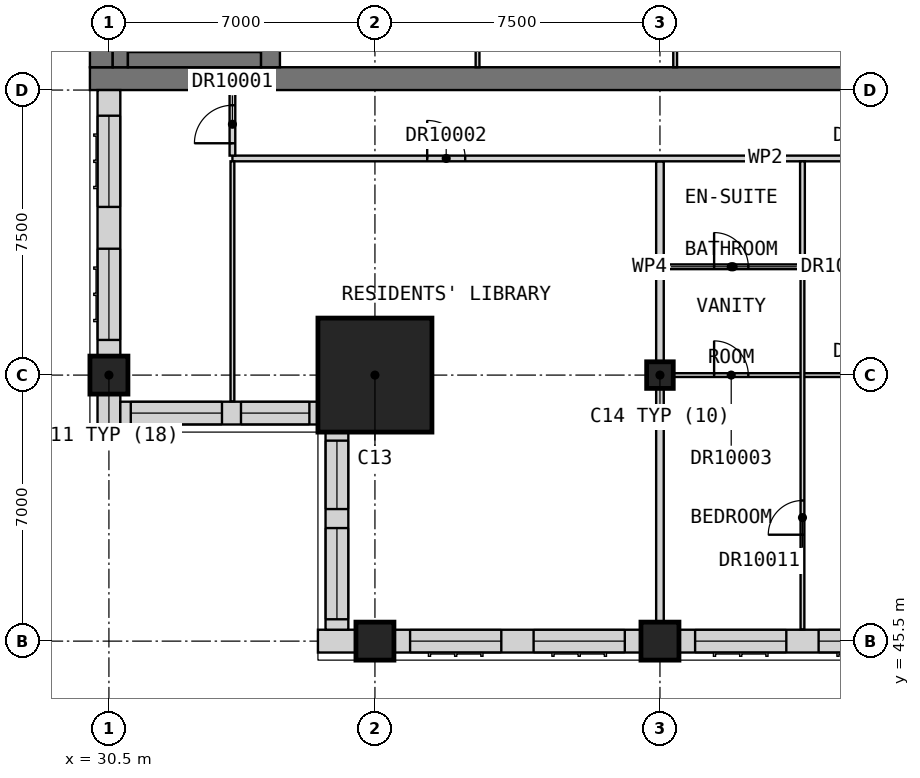
"""IFC4 building model, lengths in metres.
Left out: names, types, materials, properties, quantities, classifications, styles, units other than length and angle.
Written with IfcOpenShell. Run it as: python <this file> out.ifc"""

import sys

from ifc_helpers import new_model, si_unit, direction, frame, frame_2d, origin, origin_2d, place, context, subcontext, project, spatial, rectangle, extrude, element, fill, save


model = new_model("IFC4")
c1 = context("Model", 3, precision=1e-05, world=origin(), true_north=direction((0.0, 1.0)))
c2 = subcontext(c1, "Body", "Model", "MODEL_VIEW")
j1 = project(units=[si_unit("LENGTHUNIT", "METRE"), si_unit("PLANEANGLEUNIT", "RADIAN")], contexts=[c1])
p1 = place(None, origin())
s1 = spatial("IfcSite", under=j1, at=p1, CompositionType="ELEMENT")
p2 = place(p1, origin())
s2 = spatial("IfcBuilding", under=s1, at=p2, CompositionType="ELEMENT")
p3 = place(p2, frame((0.0, 0.0, 283.7)))
s3 = spatial("IfcBuildingStorey", under=s2, at=p3, CompositionType="ELEMENT", Elevation=283.7)
for number, where, z_axis, x_axis in (
    (1, (30.5, 52.5, 0.0), (0.0, 0.0, 1.0), (1.0, 0.0, 0.0)),
    (2, (37.5, 45.5, 0.0), (0.0, 0.0, 1.0), (1.0, 0.0, 0.0)),
    (3, (45.0, 45.5, 0.0), (0.0, 0.0, 1.0), (1.0, 0.0, 0.0)),
):
    element("IfcColumn", number, at=place(p3, frame(where, z_axis=z_axis, x_axis=x_axis)), inside=s3, PredefinedType="COLUMN", context=c2, shape_type="SweptSolid", body=[
        extrude(rectangle(XDim=1.0, YDim=1.0, at=origin_2d()), origin(), (0.0, 0.0, 1.0), 3.5),
    ])
p4 = place(p3, frame((45.0, 52.5, 0.0), z_axis=(0.0, 0.0, 1.0), x_axis=(1.0, 0.0, 0.0)))
e4 = element("IfcColumn", 4, at=p4, inside=s3, PredefinedType="COLUMN", context=c2, shape_type="SweptSolid", body=[
    extrude(rectangle(XDim=0.7, YDim=0.7, at=origin_2d()), origin(), (0.0, 0.0, 1.0), 3.5),
])
p5 = place(p3, frame((37.5, 52.5, 0.0), z_axis=(0.0, 0.0, 1.0), x_axis=(1.0, 0.0, 0.0)))
e5 = element("IfcColumn", 5, at=p5, inside=s3, PredefinedType="COLUMN", context=c2, shape_type="SweptSolid", body=[
    extrude(rectangle(XDim=3.0, YDim=3.0, at=origin_2d()), origin(), (0.0, 0.0, 1.0), 3.5),
])
p6 = place(p3, frame((30.0, 60.3, 0.0), z_axis=(0.0, 0.0, 1.0), x_axis=(1.0, 0.0, 0.0)))
e6 = element("IfcWall", 6, at=p6, inside=s3, PredefinedType="SHEAR", context=c2, shape_type="SweptSolid", body=[
    extrude(rectangle(XDim=30.0, YDim=0.6, at=frame_2d((15.0, 0.0))), origin(), (0.0, 0.0, 1.0), 3.5),
])
p7 = place(p6, frame((21.9, 0.0, 0.0)))
e7 = element("IfcOpeningElement", 7, at=p7, cuts=e6, PredefinedType="OPENING", context=c2, shape_type="SweptSolid", body=[
    extrude(rectangle(XDim=1.8, YDim=2.1, at=frame_2d((0.9, 1.05))), frame((0.0, 0.31, 0.0), z_axis=(0.0, -1.0, 0.0), x_axis=(1.0, 0.0, 0.0)), (0.0, 0.0, 1.0), 0.62),
])
p8 = place(p6, frame((26.5, 0.0, 0.0)))
e8 = element("IfcOpeningElement", 8, at=p8, cuts=e6, PredefinedType="OPENING", context=c2, shape_type="SweptSolid", body=[
    extrude(rectangle(XDim=1.2, YDim=2.1, at=frame_2d((0.6, 1.05))), frame((0.0, 0.31, 0.0), z_axis=(0.0, -1.0, 0.0), x_axis=(1.0, 0.0, 0.0)), (0.0, 0.0, 1.0), 0.62),
])
p9 = place(p3, frame((30.3, 60.6, 0.0), z_axis=(0.0, 0.0, 1.0), x_axis=(0.0, 1.0, 0.0)))
e9 = element("IfcWall", 9, at=p9, inside=s3, PredefinedType="SHEAR", context=c2, shape_type="SweptSolid", body=[
    extrude(rectangle(XDim=21.3, YDim=0.6, at=frame_2d((10.65, 0.0))), origin(), (0.0, 0.0, 1.0), 3.5),
])
p10 = place(p3, frame((34.75, 60.6, 0.0), z_axis=(0.0, 0.0, 1.0), x_axis=(0.0, 1.0, 0.0)))
e10 = element("IfcWall", 10, at=p10, inside=s3, PredefinedType="SHEAR", context=c2, shape_type="SweptSolid", body=[
    extrude(rectangle(XDim=3.6, YDim=0.5, at=frame_2d((1.8, 0.0))), origin(), (0.0, 0.0, 1.0), 3.5),
])
p11 = place(p3, frame((36.0, 45.5, 0.0), z_axis=(0.0, 0.0, 1.0), x_axis=(1.0, 0.0, 0.0)))
e11 = element("IfcWall", 11, at=p11, inside=s3, PredefinedType="SOLIDWALL", context=c2, shape_type="SweptSolid", body=[
    extrude(rectangle(XDim=1.0, YDim=0.6, at=frame_2d((0.5, 0.0))), origin(), (0.0, 0.0, 1.0), 3.2),
])
p12 = place(p3, frame((38.0, 45.5, 0.0), z_axis=(0.0, 0.0, 1.0), x_axis=(1.0, 0.0, 0.0)))
e12 = element("IfcWall", 12, at=p12, inside=s3, PredefinedType="SOLIDWALL", context=c2, shape_type="SweptSolid", body=[
    extrude(rectangle(XDim=6.5, YDim=0.6, at=frame_2d((3.25, 0.0))), origin(), (0.0, 0.0, 1.0), 2.75),
])
p13 = place(p12, frame((0.425, 0.0, 0.8)))
e13 = element("IfcOpeningElement", 13, at=p13, cuts=e12, PredefinedType="OPENING", context=c2, shape_type="SweptSolid", body=[
    extrude(rectangle(XDim=2.4, YDim=1.8, at=frame_2d((1.2, 0.9))), frame((0.0, 0.31, 0.0), z_axis=(0.0, -1.0, 0.0), x_axis=(1.0, 0.0, 0.0)), (0.0, 0.0, 1.0), 0.62),
])
p14 = place(p12, frame((3.675, 0.0, 0.8)))
e14 = element("IfcOpeningElement", 14, at=p14, cuts=e12, PredefinedType="OPENING", context=c2, shape_type="SweptSolid", body=[
    extrude(rectangle(XDim=2.4, YDim=1.8, at=frame_2d((1.2, 0.9))), frame((0.0, 0.31, 0.0), z_axis=(0.0, -1.0, 0.0), x_axis=(1.0, 0.0, 0.0)), (0.0, 0.0, 1.0), 0.62),
])
p15 = place(p3, frame((45.5, 45.5, 0.0), z_axis=(0.0, 0.0, 1.0), x_axis=(1.0, 0.0, 0.0)))
e15 = element("IfcWall", 15, at=p15, inside=s3, PredefinedType="SOLIDWALL", context=c2, shape_type="SweptSolid", body=[
    extrude(rectangle(XDim=6.5, YDim=0.6, at=frame_2d((3.25, 0.0))), origin(), (0.0, 0.0, 1.0), 2.75),
])
p16 = place(p15, frame((0.425, 0.0, 0.8)))
e16 = element("IfcOpeningElement", 16, at=p16, cuts=e15, PredefinedType="OPENING", context=c2, shape_type="SweptSolid", body=[
    extrude(rectangle(XDim=2.4, YDim=1.8, at=frame_2d((1.2, 0.9))), frame((0.0, 0.31, 0.0), z_axis=(0.0, -1.0, 0.0), x_axis=(1.0, 0.0, 0.0)), (0.0, 0.0, 1.0), 0.62),
])
p17 = place(p15, frame((3.675, 0.0, 0.8)))
e17 = element("IfcOpeningElement", 17, at=p17, cuts=e15, PredefinedType="OPENING", context=c2, shape_type="SweptSolid", body=[
    extrude(rectangle(XDim=2.4, YDim=1.8, at=frame_2d((1.2, 0.9))), frame((0.0, 0.31, 0.0), z_axis=(0.0, -1.0, 0.0), x_axis=(1.0, 0.0, 0.0)), (0.0, 0.0, 1.0), 0.62),
])
p18 = place(p3, frame((30.5, 60.0, 0.0), z_axis=(0.0, 0.0, 1.0), x_axis=(0.0, -1.0, 0.0)))
e18 = element("IfcWall", 18, at=p18, inside=s3, PredefinedType="SOLIDWALL", context=c2, shape_type="SweptSolid", body=[
    extrude(rectangle(XDim=7.0, YDim=0.6, at=frame_2d((3.5, 0.0))), origin(), (0.0, 0.0, 1.0), 3.2),
])
p19 = place(p18, frame((4.175, 0.0, 0.8)))
e19 = element("IfcOpeningElement", 19, at=p19, cuts=e18, PredefinedType="OPENING", context=c2, shape_type="SweptSolid", body=[
    extrude(rectangle(XDim=2.4, YDim=1.8, at=frame_2d((1.2, 0.9))), frame((0.0, 0.31, 0.0), z_axis=(0.0, -1.0, 0.0), x_axis=(1.0, 0.0, 0.0)), (0.0, 0.0, 1.0), 0.62),
])
p20 = place(p18, frame((0.675, 0.0, 0.8)))
e20 = element("IfcOpeningElement", 20, at=p20, cuts=e18, PredefinedType="OPENING", context=c2, shape_type="SweptSolid", body=[
    extrude(rectangle(XDim=2.4, YDim=1.8, at=frame_2d((1.2, 0.9))), frame((0.0, 0.31, 0.0), z_axis=(0.0, -1.0, 0.0), x_axis=(1.0, 0.0, 0.0)), (0.0, 0.0, 1.0), 0.62),
])
p21 = place(p3, frame((30.5, 52.0, 0.0), z_axis=(0.0, 0.0, 1.0), x_axis=(0.0, -1.0, 0.0)))
e21 = element("IfcWall", 21, at=p21, inside=s3, PredefinedType="SOLIDWALL", context=c2, shape_type="SweptSolid", body=[
    extrude(rectangle(XDim=1.0, YDim=0.6, at=frame_2d((0.5, 0.0))), origin(), (0.0, 0.0, 1.0), 3.2),
])
p22 = place(p3, frame((30.8, 51.5, 0.0), z_axis=(0.0, 0.0, 1.0), x_axis=(1.0, 0.0, 0.0)))
e22 = element("IfcWall", 22, at=p22, inside=s3, PredefinedType="SOLIDWALL", context=c2, shape_type="SweptSolid", body=[
    extrude(rectangle(XDim=5.2, YDim=0.6, at=frame_2d((2.6, 0.0))), origin(), (0.0, 0.0, 1.0), 3.2),
])
p23 = place(p22, frame((0.275, 0.0, 0.8)))
e23 = element("IfcOpeningElement", 23, at=p23, cuts=e22, PredefinedType="OPENING", context=c2, shape_type="SweptSolid", body=[
    extrude(rectangle(XDim=2.4, YDim=1.8, at=frame_2d((1.2, 0.9))), frame((0.0, 0.31, 0.0), z_axis=(0.0, -1.0, 0.0), x_axis=(1.0, 0.0, 0.0)), (0.0, 0.0, 1.0), 0.62),
])
p24 = place(p22, frame((3.175, 0.0, 0.8)))
e24 = element("IfcOpeningElement", 24, at=p24, cuts=e22, PredefinedType="OPENING", context=c2, shape_type="SweptSolid", body=[
    extrude(rectangle(XDim=1.8, YDim=1.8, at=frame_2d((0.9, 0.9))), frame((0.0, 0.31, 0.0), z_axis=(0.0, -1.0, 0.0), x_axis=(1.0, 0.0, 0.0)), (0.0, 0.0, 1.0), 0.62),
])
p25 = place(p3, frame((36.5, 51.0, 0.0), z_axis=(0.0, 0.0, 1.0), x_axis=(0.0, -1.0, 0.0)))
e25 = element("IfcWall", 25, at=p25, inside=s3, PredefinedType="SOLIDWALL", context=c2, shape_type="SweptSolid", body=[
    extrude(rectangle(XDim=5.2, YDim=0.6, at=frame_2d((2.6, 0.0))), origin(), (0.0, 0.0, 1.0), 3.2),
])
p26 = place(p25, frame((2.525, 0.0, 0.8)))
e26 = element("IfcOpeningElement", 26, at=p26, cuts=e25, PredefinedType="OPENING", context=c2, shape_type="SweptSolid", body=[
    extrude(rectangle(XDim=2.4, YDim=1.8, at=frame_2d((1.2, 0.9))), frame((0.0, 0.31, 0.0), z_axis=(0.0, -1.0, 0.0), x_axis=(1.0, 0.0, 0.0)), (0.0, 0.0, 1.0), 0.62),
])
p27 = place(p25, frame((0.225, 0.0, 0.8)))
e27 = element("IfcOpeningElement", 27, at=p27, cuts=e25, PredefinedType="OPENING", context=c2, shape_type="SweptSolid", body=[
    extrude(rectangle(XDim=1.8, YDim=1.8, at=frame_2d((0.9, 0.9))), frame((0.0, 0.31, 0.0), z_axis=(0.0, -1.0, 0.0), x_axis=(1.0, 0.0, 0.0)), (0.0, 0.0, 1.0), 0.62),
])
for number, where, z_axis, x_axis in (
    (28, (40.2, 60.6, 0.0), (0.0, 0.0, 1.0), (0.0, 1.0, 0.0)),
    (29, (45.4, 60.6, 0.0), (0.0, 0.0, 1.0), (0.0, 1.0, 0.0)),
):
    element("IfcWall", number, at=place(p3, frame(where, z_axis=z_axis, x_axis=x_axis)), inside=s3, PredefinedType="PARTITIONING", context=c2, shape_type="SweptSolid", body=[
        extrude(rectangle(XDim=3.4, YDim=0.1, at=frame_2d((1.7, 0.0))), origin(), (0.0, 0.0, 1.0), 3.2),
    ])
p28 = place(p3, frame((30.8, 60.6, 0.0), z_axis=(0.0, 0.0, 1.0), x_axis=(0.0, 1.0, 0.0)))
e30 = element("IfcWall", 30, at=p28, inside=s3, PredefinedType="SOLIDWALL", context=c2, shape_type="SweptSolid", body=[
    extrude(rectangle(XDim=21.3, YDim=0.4, at=frame_2d((10.65, 0.0))), origin(), (0.0, 0.0, 1.0), 3.2),
])
p29 = place(p3, frame((31.0, 60.8, 0.0), z_axis=(0.0, 0.0, 1.0), x_axis=(1.0, 0.0, 0.0)))
e31 = element("IfcWall", 31, at=p29, inside=s3, PredefinedType="SOLIDWALL", context=c2, shape_type="SweptSolid", body=[
    extrude(rectangle(XDim=3.5, YDim=0.4, at=frame_2d((1.75, 0.0))), origin(), (0.0, 0.0, 1.0), 3.2),
])
p30 = place(p3, frame((45.0, 45.0, 0.0), z_axis=(0.0, 0.0, 1.0), x_axis=(0.0, 1.0, 0.0)))
e32 = element("IfcWall", 32, at=p30, inside=s3, PredefinedType="PARTITIONING", context=c2, shape_type="SweptSolid", body=[
    extrude(rectangle(XDim=13.125, YDim=0.2, at=frame_2d((6.562, 0.0))), origin(), (0.0, 0.0, 1.0), 3.2),
])
p31 = place(p3, frame((33.75, 58.2, 0.0), z_axis=(0.0, 0.0, 1.0), x_axis=(1.0, 0.0, 0.0)))
e33 = element("IfcWall", 33, at=p31, inside=s3, PredefinedType="PARTITIONING", context=c2, shape_type="SweptSolid", body=[
    extrude(rectangle(XDim=28.05, YDim=0.15, at=frame_2d((14.025, 0.0))), origin(), (0.0, 0.0, 1.0), 3.2),
])
p32 = place(p31, frame((5.125, 0.0, 0.0)))
e34 = element("IfcOpeningElement", 34, at=p32, cuts=e33, PredefinedType="OPENING", context=c2, shape_type="SweptSolid", body=[
    extrude(rectangle(XDim=1.0, YDim=2.1, at=frame_2d((0.5, 1.05))), frame((0.0, 0.085, 0.0), z_axis=(0.0, -1.0, 0.0), x_axis=(1.0, 0.0, 0.0)), (0.0, 0.0, 1.0), 0.17),
])
p33 = place(p31, frame((16.425, 0.0, 0.0)))
e35 = element("IfcOpeningElement", 35, at=p33, cuts=e33, PredefinedType="OPENING", context=c2, shape_type="SweptSolid", body=[
    extrude(rectangle(XDim=0.9, YDim=2.1, at=frame_2d((0.45, 1.05))), frame((0.0, 0.085, 0.0), z_axis=(0.0, -1.0, 0.0), x_axis=(1.0, 0.0, 0.0)), (0.0, 0.0, 1.0), 0.17),
])
p34 = place(p31, frame((26.65, 0.0, 0.0)))
e36 = element("IfcOpeningElement", 36, at=p34, cuts=e33, PredefinedType="OPENING", context=c2, shape_type="SweptSolid", body=[
    extrude(rectangle(XDim=1.0, YDim=2.1, at=frame_2d((0.5, 1.05))), frame((0.0, 0.085, 0.0), z_axis=(0.0, -1.0, 0.0), x_axis=(1.0, 0.0, 0.0)), (0.0, 0.0, 1.0), 0.17),
])
p35 = place(p3, frame((33.75, 58.275, 0.0), z_axis=(0.0, 0.0, 1.0), x_axis=(0.0, 1.0, 0.0)))
e37 = element("IfcWall", 37, at=p35, inside=s3, PredefinedType="PARTITIONING", context=c2, shape_type="SweptSolid", body=[
    extrude(rectangle(XDim=1.725, YDim=0.15, at=frame_2d((0.863, 0.0))), origin(), (0.0, 0.0, 1.0), 3.2),
])
p36 = place(p35, frame((0.325, 0.0, 0.0)))
e38 = element("IfcOpeningElement", 38, at=p36, cuts=e37, PredefinedType="OPENING", context=c2, shape_type="SweptSolid", body=[
    extrude(rectangle(XDim=1.0, YDim=2.1, at=frame_2d((0.5, 1.05))), frame((0.0, 0.085, 0.0), z_axis=(0.0, -1.0, 0.0), x_axis=(1.0, 0.0, 0.0)), (0.0, 0.0, 1.0), 0.17),
])
p37 = place(p3, frame((45.1, 52.5, 0.0), z_axis=(0.0, 0.0, 1.0), x_axis=(1.0, 0.0, 0.0)))
e39 = element("IfcWall", 39, at=p37, inside=s3, PredefinedType="PARTITIONING", context=c2, shape_type="SweptSolid", body=[
    extrude(rectangle(XDim=14.8, YDim=0.1, at=frame_2d((7.4, 0.0))), origin(), (0.0, 0.0, 1.0), 3.2),
])
p38 = place(p37, frame((1.325, 0.0, 0.0)))
e40 = element("IfcOpeningElement", 40, at=p38, cuts=e39, PredefinedType="OPENING", context=c2, shape_type="SweptSolid", body=[
    extrude(rectangle(XDim=0.9, YDim=2.1, at=frame_2d((0.45, 1.05))), frame((0.0, 0.06, 0.0), z_axis=(0.0, -1.0, 0.0), x_axis=(1.0, 0.0, 0.0)), (0.0, 0.0, 1.0), 0.12),
])
p39 = place(p37, frame((5.075, 0.0, 0.0)))
e41 = element("IfcOpeningElement", 41, at=p39, cuts=e39, PredefinedType="OPENING", context=c2, shape_type="SweptSolid", body=[
    extrude(rectangle(XDim=0.9, YDim=2.1, at=frame_2d((0.45, 1.05))), frame((0.0, 0.06, 0.0), z_axis=(0.0, -1.0, 0.0), x_axis=(1.0, 0.0, 0.0)), (0.0, 0.0, 1.0), 0.12),
])
p40 = place(p37, frame((12.575, 0.0, 0.0)))
e42 = element("IfcOpeningElement", 42, at=p40, cuts=e39, PredefinedType="OPENING", context=c2, shape_type="SweptSolid", body=[
    extrude(rectangle(XDim=0.9, YDim=2.1, at=frame_2d((0.45, 1.05))), frame((0.0, 0.06, 0.0), z_axis=(0.0, -1.0, 0.0), x_axis=(1.0, 0.0, 0.0)), (0.0, 0.0, 1.0), 0.12),
])
p41 = place(p3, frame((33.75, 51.81, 0.0), z_axis=(0.0, 0.0, 1.0), x_axis=(0.0, 1.0, 0.0)))
e43 = element("IfcWall", 43, at=p41, inside=s3, PredefinedType="PARTITIONING", context=c2, shape_type="SweptSolid", body=[
    extrude(rectangle(XDim=6.315, YDim=0.1, at=frame_2d((3.157, 0.0))), origin(), (0.0, 0.0, 1.0), 3.2),
])
p42 = place(p3, frame((48.75, 45.81, 0.0), z_axis=(0.0, 0.0, 1.0), x_axis=(0.0, 1.0, 0.0)))
e44 = element("IfcWall", 44, at=p42, inside=s3, PredefinedType="PARTITIONING", context=c2, shape_type="SweptSolid", body=[
    extrude(rectangle(XDim=9.478, YDim=0.1, at=frame_2d((4.739, 0.0))), origin(), (0.0, 0.0, 1.0), 3.2),
])
p43 = place(p42, frame((2.49, 0.0, 0.0)))
e45 = element("IfcOpeningElement", 45, at=p43, cuts=e44, PredefinedType="OPENING", context=c2, shape_type="SweptSolid", body=[
    extrude(rectangle(XDim=0.9, YDim=2.1, at=frame_2d((0.45, 1.05))), frame((0.0, 0.06, 0.0), z_axis=(0.0, -1.0, 0.0), x_axis=(1.0, 0.0, 0.0)), (0.0, 0.0, 1.0), 0.12),
])
p44 = place(p3, frame((45.1, 55.35, 0.0), z_axis=(0.0, 0.0, 1.0), x_axis=(1.0, 0.0, 0.0)))
e46 = element("IfcWall", 46, at=p44, inside=s3, PredefinedType="PARTITIONING", context=c2, shape_type="SweptSolid", body=[
    extrude(rectangle(XDim=3.65, YDim=0.125, at=frame_2d((1.825, 0.0))), origin(), (0.0, 0.0, 1.0), 3.2),
])
p45 = place(p44, frame((1.325, 0.0, 0.0)))
e47 = element("IfcOpeningElement", 47, at=p45, cuts=e46, PredefinedType="OPENING", context=c2, shape_type="SweptSolid", body=[
    extrude(rectangle(XDim=0.9, YDim=2.1, at=frame_2d((0.45, 1.05))), frame((0.0, 0.073, 0.0), z_axis=(0.0, -1.0, 0.0), x_axis=(1.0, 0.0, 0.0)), (0.0, 0.0, 1.0), 0.145),
])
p46 = place(p3, frame((48.75, 55.413, 0.0), z_axis=(0.0, 0.0, 1.0), x_axis=(0.0, 1.0, 0.0)))
e48 = element("IfcWall", 48, at=p46, inside=s3, PredefinedType="PARTITIONING", context=c2, shape_type="SweptSolid", body=[
    extrude(rectangle(XDim=2.712, YDim=0.125, at=frame_2d((1.356, 0.0))), origin(), (0.0, 0.0, 1.0), 3.2),
])
p47 = place(p13, origin())
e49 = element("IfcWindow", 49, at=p47, inside=s3, PartitioningType="SINGLE_PANEL", PredefinedType="WINDOW", context=c2, shape_type="SweptSolid", body=[
    extrude(rectangle(XDim=2.4, YDim=1.8, at=frame_2d((1.2, 0.9))), frame((0.0, -0.07, 0.0), z_axis=(0.0, -1.0, 0.0), x_axis=(1.0, 0.0, 0.0)), (0.0, 0.0, 1.0), 0.06),
])
fill(e13, e49)
p48 = place(p14, origin())
e50 = element("IfcWindow", 50, at=p48, inside=s3, PartitioningType="SINGLE_PANEL", PredefinedType="WINDOW", context=c2, shape_type="SweptSolid", body=[
    extrude(rectangle(XDim=2.4, YDim=1.8, at=frame_2d((1.2, 0.9))), frame((0.0, -0.07, 0.0), z_axis=(0.0, -1.0, 0.0), x_axis=(1.0, 0.0, 0.0)), (0.0, 0.0, 1.0), 0.06),
])
fill(e14, e50)
p49 = place(p16, origin())
e51 = element("IfcWindow", 51, at=p49, inside=s3, PartitioningType="SINGLE_PANEL", PredefinedType="WINDOW", context=c2, shape_type="SweptSolid", body=[
    extrude(rectangle(XDim=2.4, YDim=1.8, at=frame_2d((1.2, 0.9))), frame((0.0, -0.07, 0.0), z_axis=(0.0, -1.0, 0.0), x_axis=(1.0, 0.0, 0.0)), (0.0, 0.0, 1.0), 0.06),
])
fill(e16, e51)
p50 = place(p17, origin())
e52 = element("IfcWindow", 52, at=p50, inside=s3, PartitioningType="SINGLE_PANEL", PredefinedType="WINDOW", context=c2, shape_type="SweptSolid", body=[
    extrude(rectangle(XDim=2.4, YDim=1.8, at=frame_2d((1.2, 0.9))), frame((0.0, -0.07, 0.0), z_axis=(0.0, -1.0, 0.0), x_axis=(1.0, 0.0, 0.0)), (0.0, 0.0, 1.0), 0.06),
])
fill(e17, e52)
p51 = place(p19, origin())
e53 = element("IfcWindow", 53, at=p51, inside=s3, PartitioningType="SINGLE_PANEL", PredefinedType="WINDOW", context=c2, shape_type="SweptSolid", body=[
    extrude(rectangle(XDim=2.4, YDim=1.8, at=frame_2d((1.2, 0.9))), frame((0.0, -0.07, 0.0), z_axis=(0.0, -1.0, 0.0), x_axis=(1.0, 0.0, 0.0)), (0.0, 0.0, 1.0), 0.06),
])
fill(e19, e53)
p52 = place(p20, origin())
e54 = element("IfcWindow", 54, at=p52, inside=s3, PartitioningType="SINGLE_PANEL", PredefinedType="WINDOW", context=c2, shape_type="SweptSolid", body=[
    extrude(rectangle(XDim=2.4, YDim=1.8, at=frame_2d((1.2, 0.9))), frame((0.0, -0.07, 0.0), z_axis=(0.0, -1.0, 0.0), x_axis=(1.0, 0.0, 0.0)), (0.0, 0.0, 1.0), 0.06),
])
fill(e20, e54)
p53 = place(p23, origin())
e55 = element("IfcWindow", 55, at=p53, inside=s3, PartitioningType="SINGLE_PANEL", PredefinedType="WINDOW", context=c2, shape_type="SweptSolid", body=[
    extrude(rectangle(XDim=2.4, YDim=1.8, at=frame_2d((1.2, 0.9))), frame((0.0, -0.07, 0.0), z_axis=(0.0, -1.0, 0.0), x_axis=(1.0, 0.0, 0.0)), (0.0, 0.0, 1.0), 0.06),
])
fill(e23, e55)
p54 = place(p24, origin())
e56 = element("IfcWindow", 56, at=p54, inside=s3, PartitioningType="SINGLE_PANEL", PredefinedType="WINDOW", context=c2, shape_type="SweptSolid", body=[
    extrude(rectangle(XDim=1.8, YDim=1.8, at=frame_2d((0.9, 0.9))), frame((0.0, -0.07, 0.0), z_axis=(0.0, -1.0, 0.0), x_axis=(1.0, 0.0, 0.0)), (0.0, 0.0, 1.0), 0.06),
])
fill(e24, e56)
p55 = place(p26, origin())
e57 = element("IfcWindow", 57, at=p55, inside=s3, PartitioningType="SINGLE_PANEL", PredefinedType="WINDOW", context=c2, shape_type="SweptSolid", body=[
    extrude(rectangle(XDim=2.4, YDim=1.8, at=frame_2d((1.2, 0.9))), frame((0.0, -0.07, 0.0), z_axis=(0.0, -1.0, 0.0), x_axis=(1.0, 0.0, 0.0)), (0.0, 0.0, 1.0), 0.06),
])
fill(e26, e57)
p56 = place(p27, origin())
e58 = element("IfcWindow", 58, at=p56, inside=s3, PartitioningType="SINGLE_PANEL", PredefinedType="WINDOW", context=c2, shape_type="SweptSolid", body=[
    extrude(rectangle(XDim=1.8, YDim=1.8, at=frame_2d((0.9, 0.9))), frame((0.0, -0.07, 0.0), z_axis=(0.0, -1.0, 0.0), x_axis=(1.0, 0.0, 0.0)), (0.0, 0.0, 1.0), 0.06),
])
fill(e27, e58)
p57 = place(p36, origin())
e59 = element("IfcDoor", 59, at=p57, inside=s3, OperationType="SINGLE_SWING_RIGHT", PredefinedType="DOOR", context=c2, shape_type="SweptSolid", body=[
    extrude(rectangle(XDim=1.0, YDim=2.1, at=frame_2d((0.5, 1.05))), frame((0.0, 0.025, 0.0), z_axis=(0.0, -1.0, 0.0), x_axis=(1.0, 0.0, 0.0)), (0.0, 0.0, 1.0), 0.05),
])
fill(e38, e59)
p58 = place(p32, origin())
e60 = element("IfcDoor", 60, at=p58, inside=s3, OperationType="SINGLE_SWING_RIGHT", PredefinedType="DOOR", context=c2, shape_type="SweptSolid", body=[
    extrude(rectangle(XDim=1.0, YDim=2.1, at=frame_2d((0.5, 1.05))), frame((0.0, 0.025, 0.0), z_axis=(0.0, -1.0, 0.0), x_axis=(1.0, 0.0, 0.0)), (0.0, 0.0, 1.0), 0.05),
])
fill(e34, e60)
p59 = place(p38, origin())
e61 = element("IfcDoor", 61, at=p59, inside=s3, OperationType="SINGLE_SWING_LEFT", PredefinedType="DOOR", context=c2, shape_type="SweptSolid", body=[
    extrude(rectangle(XDim=0.9, YDim=2.1, at=frame_2d((0.45, 1.05))), frame((0.0, 0.025, 0.0), z_axis=(0.0, -1.0, 0.0), x_axis=(1.0, 0.0, 0.0)), (0.0, 0.0, 1.0), 0.05),
])
fill(e40, e61)
p60 = place(p45, origin())
e62 = element("IfcDoor", 62, at=p60, inside=s3, OperationType="SINGLE_SWING_LEFT", PredefinedType="DOOR", context=c2, shape_type="SweptSolid", body=[
    extrude(rectangle(XDim=0.9, YDim=2.1, at=frame_2d((0.45, 1.05))), frame((0.0, 0.025, 0.0), z_axis=(0.0, -1.0, 0.0), x_axis=(1.0, 0.0, 0.0)), (0.0, 0.0, 1.0), 0.05),
])
fill(e47, e62)
p61 = place(p43, origin())
e63 = element("IfcDoor", 63, at=p61, inside=s3, OperationType="SINGLE_SWING_LEFT", PredefinedType="DOOR", context=c2, shape_type="SweptSolid", body=[
    extrude(rectangle(XDim=0.9, YDim=2.1, at=frame_2d((0.45, 1.05))), frame((0.0, 0.025, 0.0), z_axis=(0.0, -1.0, 0.0), x_axis=(1.0, 0.0, 0.0)), (0.0, 0.0, 1.0), 0.05),
])
fill(e45, e63)
save(model, sys.argv[1])
